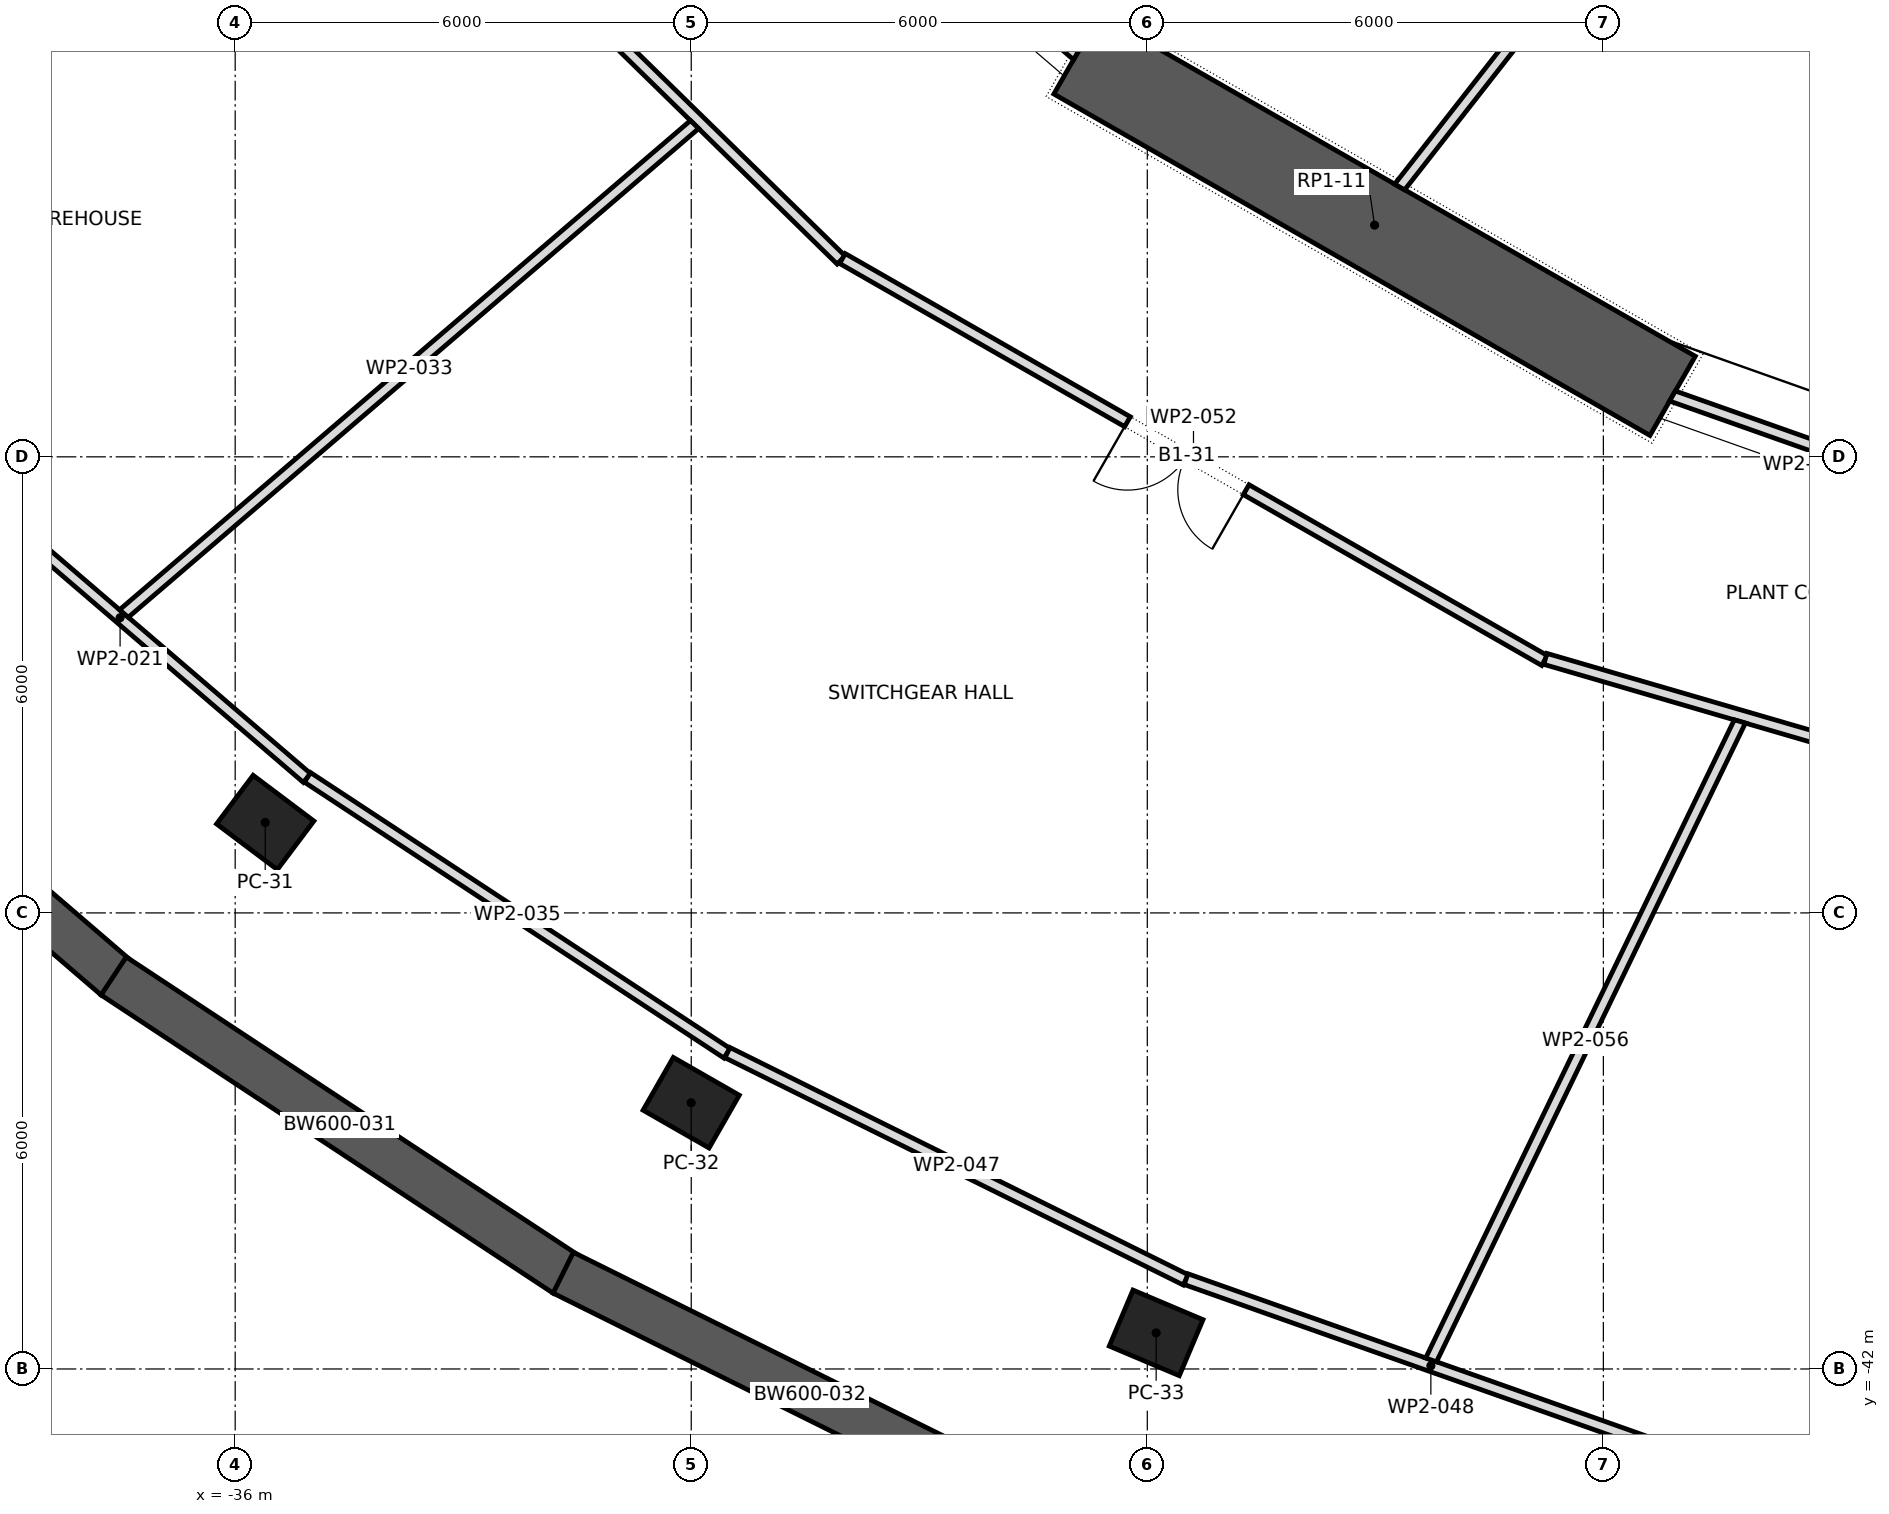
"""IFC4 building model, lengths in metres.
Left out: names, types, materials, properties, quantities, classifications, styles, units other than length and angle.
Written with IfcOpenShell. Run it as: python <this file> out.ifc"""

import sys

from ifc_helpers import new_model, si_unit, direction, frame, frame_2d, origin, origin_2d, place, context, subcontext, project, spatial, polyline, rectangle, outline, extrude, element, fill, save


model = new_model("IFC4")
c1 = context("Model", 3, precision=1e-05, world=origin(), true_north=direction((0.0, 1.0)))
c2 = subcontext(c1, "Body", "Model", "MODEL_VIEW")
j1 = project(units=[si_unit("LENGTHUNIT", "METRE"), si_unit("PLANEANGLEUNIT", "RADIAN")], contexts=[c1])
p1 = place(None, origin())
s1 = spatial("IfcSite", under=j1, at=p1, CompositionType="ELEMENT")
p2 = place(p1, origin())
s2 = spatial("IfcBuilding", under=s1, at=p2, CompositionType="ELEMENT")
p3 = place(p2, frame((0.0, 0.0, -4.0)))
s3 = spatial("IfcBuildingStorey", under=s2, at=p3, CompositionType="ELEMENT", Elevation=-4.0)
for number, where, z_axis, x_axis in (
    (1, (-35.605, -34.81, 0.0), (0.0, 0.0, 1.0), (0.799, -0.601, 0.0)),
    (2, (-30.001, -38.497, 0.0), (0.0, 0.0, 1.0), (0.868, -0.497, 0.0)),
    (3, (-23.884, -41.525, 0.0), (0.0, 0.0, 1.0), (0.921, -0.389, 0.0)),
):
    element("IfcColumn", number, at=place(p3, frame(where, z_axis=z_axis, x_axis=x_axis)), inside=s3, PredefinedType="COLUMN", context=c2, shape_type="SweptSolid", body=[
        extrude(rectangle(XDim=1.0, YDim=0.8, at=origin_2d()), origin(), (0.0, 0.0, 1.0), 4.0),
    ])
p4 = place(p3, frame((-24.931, -24.706, 0.0), z_axis=(0.0, 0.0, 1.0), x_axis=(0.867760656864, -0.496982336103, 0.0)))
e4 = element("IfcWall", 4, at=p4, inside=s3, PredefinedType="SHEAR", context=c2, shape_type="SweptSolid", body=[
    extrude(rectangle(XDim=9.038, YDim=1.2, at=frame_2d((4.519, 0.0))), origin(), (0.0, 0.0, 1.0), 4.0),
])
p5 = place(p3, frame((-42.87, -32.295, 0.0), z_axis=(0.0, 0.0, 1.0), x_axis=(0.758319142722, -0.65188348482, 0.0)))
e5 = element("IfcWall", 5, at=p5, inside=s3, PredefinedType="SOLIDWALL", context=c2, shape_type="SweptSolid", body=[
    extrude(rectangle(XDim=6.991, YDim=0.6, at=frame_2d((3.496, 0.0))), origin(), (0.0, 0.0, 1.0), 4.0),
])
p6 = place(p3, frame((-37.599, -36.83, 0.0), z_axis=(0.0, 0.0, 1.0), x_axis=(0.834745196239, -0.550636411215, 0.0)))
e6 = element("IfcWall", 6, at=p6, inside=s3, PredefinedType="SOLIDWALL", context=c2, shape_type="SweptSolid", body=[
    extrude(rectangle(XDim=7.124, YDim=0.6, at=frame_2d((3.562, 0.0))), origin(), (0.0, 0.0, 1.0), 4.0),
])
p7 = place(p3, frame((-31.684, -40.734, 0.0), z_axis=(0.0, 0.0, 1.0), x_axis=(0.895750986496, -0.44455614965, 0.0)))
e7 = element("IfcWall", 7, at=p7, inside=s3, PredefinedType="SOLIDWALL", context=c2, shape_type="SweptSolid", body=[
    extrude(rectangle(XDim=7.245, YDim=0.6, at=frame_2d((3.623, 0.0))), origin(), (0.0, 0.0, 1.0), 4.0),
])
p8 = place(p3, frame((-39.973, -30.007, 0.0), z_axis=(0.0, 0.0, 1.0), x_axis=(0.759038455419, -0.651045791934, 0.0)))
e8 = element("IfcWall", 8, at=p8, inside=s3, PredefinedType="PARTITIONING", context=c2, shape_type="SweptSolid", body=[
    extrude(rectangle(XDim=6.479, YDim=0.15, at=frame_2d((3.24, 0.0))), origin(), (0.0, 0.0, 1.0), 3.55),
])
p9 = place(p3, frame((-35.389, -20.211, 0.0), z_axis=(0.0, 0.0, 1.0), x_axis=(0.714900505887, -0.699226191359, 0.0)))
e9 = element("IfcWall", 9, at=p9, inside=s3, PredefinedType="PARTITIONING", context=c2, shape_type="SweptSolid", body=[
    extrude(rectangle(XDim=10.296, YDim=0.15, at=frame_2d((5.148, 0.0))), origin(), (0.0, 0.0, 1.0), 3.55),
])
p10 = place(p9, frame((3.353, 0.0, 0.0)))
e10 = element("IfcOpeningElement", 10, at=p10, cuts=e9, PredefinedType="OPENING", context=c2, shape_type="SweptSolid", body=[
    extrude(rectangle(XDim=1.0, YDim=2.1, at=frame_2d((0.5, 1.05))), frame((0.0, 0.087, 0.0), z_axis=(0.0, -1.0, 0.0), x_axis=(1.0, 0.0, 0.0)), (0.0, 0.0, 1.0), 0.174),
])
p11 = place(p3, frame((-29.956, -25.628, 0.0), z_axis=(0.0, 0.0, 1.0), x_axis=(-0.759329804597, -0.650705961131, 0.0)))
e11 = element("IfcWall", 11, at=p11, inside=s3, PredefinedType="PARTITIONING", context=c2, shape_type="SweptSolid", body=[
    extrude(outline(polyline([(0.007, -0.075), (9.899, -0.075), (9.876, 0.075), (-0.007, 0.075), (0.007, -0.075)])), origin(), (0.0, 0.0, 1.0), 3.55),
])
p12 = place(p3, frame((-29.529, -37.847, 0.0), z_axis=(0.0, 0.0, 1.0), x_axis=(-0.83553583791, 0.549435950378, 0.0)))
e12 = element("IfcWall", 12, at=p12, inside=s3, PredefinedType="PARTITIONING", context=c2, shape_type="SweptSolid", body=[
    extrude(rectangle(XDim=6.606, YDim=0.15, at=frame_2d((3.303, 0.0))), origin(), (0.0, 0.0, 1.0), 3.55),
])
p13 = place(p3, frame((-28.789, -21.411, 0.0), z_axis=(0.0, 0.0, 1.0), x_axis=(0.760084552743, -0.649824185978, 0.0)))
e13 = element("IfcWall", 13, at=p13, inside=s3, PredefinedType="PARTITIONING", context=c2, shape_type="SweptSolid", body=[
    extrude(outline(polyline([(-0.015, -0.075), (5.089, -0.075), (5.061, 0.075), (0.015, 0.075), (-0.015, -0.075)])), origin(), (0.0, 0.0, 1.0), 3.1),
])
p14 = place(p3, frame((-23.493, -40.828, 0.0), z_axis=(0.0, 0.0, 1.0), x_axis=(-0.895909442692, 0.444236727991, 0.0)))
e14 = element("IfcWall", 14, at=p14, inside=s3, PredefinedType="PARTITIONING", context=c2, shape_type="SweptSolid", body=[
    extrude(rectangle(XDim=6.731, YDim=0.15, at=frame_2d((3.365, 0.0))), origin(), (0.0, 0.0, 1.0), 3.55),
])
p15 = place(p3, frame((-23.49, -40.819, 0.0), z_axis=(0.0, 0.0, 1.0), x_axis=(0.942678523295, -0.333702265079, 0.0)))
e15 = element("IfcWall", 15, at=p15, inside=s3, PredefinedType="PARTITIONING", context=c2, shape_type="SweptSolid", body=[
    extrude(rectangle(XDim=6.832, YDim=0.15, at=frame_2d((3.416, 0.0))), origin(), (0.0, 0.0, 1.0), 3.55),
])
p16 = place(p3, frame((-20.68, -26.45, 0.0), z_axis=(0.0, 0.0, 1.0), x_axis=(0.616465586388, 0.787381851962, 0.0)))
e16 = element("IfcWall", 16, at=p16, inside=s3, PredefinedType="PARTITIONING", context=c2, shape_type="SweptSolid", body=[
    extrude(outline(polyline([(0.011, -0.075), (14.1, -0.075), (14.1, 0.075), (-0.011, 0.075), (0.011, -0.075)])), origin(), (0.0, 0.0, 1.0), 3.55),
])
p17 = place(p3, frame((-18.774, -32.679, 0.0), z_axis=(0.0, 0.0, 1.0), x_axis=(-0.867830645151, 0.496860112444, 0.0)))
e17 = element("IfcWall", 17, at=p17, inside=s3, PredefinedType="PARTITIONING", context=c2, shape_type="SweptSolid", body=[
    extrude(rectangle(XDim=10.643, YDim=0.15, at=frame_2d((5.322, 0.0))), origin(), (0.0, 0.0, 1.0), 3.55),
])
p18 = place(p17, frame((4.523, 0.0, 0.0)))
e18 = element("IfcOpeningElement", 18, at=p18, cuts=e17, PredefinedType="OPENING", context=c2, shape_type="SweptSolid", body=[
    extrude(rectangle(XDim=1.8, YDim=2.1, at=frame_2d((0.9, 1.05))), frame((0.0, 0.087, 0.0), z_axis=(0.0, -1.0, 0.0), x_axis=(1.0, 0.0, 0.0)), (0.0, 0.0, 1.0), 0.174),
])
p19 = place(p3, frame((-18.763, -32.658, 0.0), z_axis=(0.0, 0.0, 1.0), x_axis=(0.960103579148, -0.279644626818, 0.0)))
e19 = element("IfcWall", 19, at=p19, inside=s3, PredefinedType="PARTITIONING", context=c2, shape_type="SweptSolid", body=[
    extrude(rectangle(XDim=10.975, YDim=0.15, at=frame_2d((5.487, 0.0))), origin(), (0.0, 0.0, 1.0), 3.55),
])
p20 = place(p3, frame((-17.091, -29.2, 0.0), z_axis=(0.0, 0.0, 1.0), x_axis=(0.942814385805, -0.333318217204, 0.0)))
e20 = element("IfcWall", 20, at=p20, inside=s3, PredefinedType="PARTITIONING", context=c2, shape_type="SweptSolid", body=[
    extrude(outline(polyline([(-0.014, -0.075), (5.448, -0.075), (5.422, 0.075), (0.014, 0.075), (-0.014, -0.075)])), origin(), (0.0, 0.0, 1.0), 3.1),
])
p21 = place(p3, frame((-16.204, -33.481, 0.0), z_axis=(0.0, 0.0, 1.0), x_axis=(-0.435389941519, -0.90024196682, 0.0)))
e21 = element("IfcWall", 21, at=p21, inside=s3, PredefinedType="PARTITIONING", context=c2, shape_type="SweptSolid", body=[
    extrude(outline(polyline([(0.013, -0.075), (9.339, -0.075), (9.323, 0.075), (-0.013, 0.075), (0.013, -0.075)])), origin(), (0.0, 0.0, 1.0), 3.55),
])
p22 = place(p18, origin())
e22 = element("IfcDoor", 22, at=p22, inside=s3, OperationType="DOUBLE_DOOR_SINGLE_SWING", PredefinedType="DOOR", context=c2, shape_type="SweptSolid", body=[
    extrude(rectangle(XDim=1.8, YDim=2.1, at=frame_2d((0.9, 1.05))), frame((0.0, 0.025, 0.0), z_axis=(0.0, -1.0, 0.0), x_axis=(1.0, 0.0, 0.0)), (0.0, 0.0, 1.0), 0.05),
])
fill(e18, e22)
save(model, sys.argv[1])
